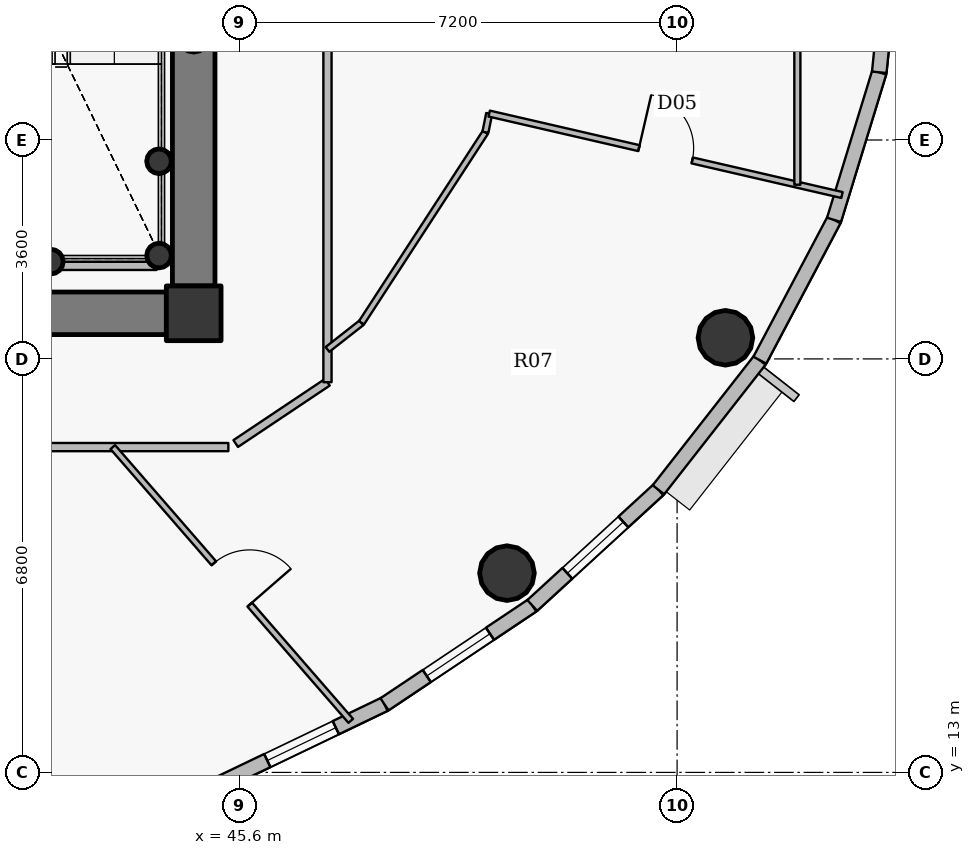
"""IFC4 building model, lengths in metres.
Left out: names, types, materials, properties, quantities, classifications, styles, units other than length and angle.
Written with IfcOpenShell. Run it as: python <this file> out.ifc"""

import sys

from ifc_helpers import new_model, si_unit, direction, frame, frame_2d, origin, origin_2d, place, context, subcontext, project, spatial, rectangle, hollow_circle, extrude, source, transform, mapped, element, fill, save


model = new_model("IFC4")
c1 = context("Model", 3, precision=1e-05, world=origin(), true_north=direction((0.0, 1.0)))
c2 = subcontext(c1, "Body", "Model", "MODEL_VIEW")
j1 = project(units=[si_unit("LENGTHUNIT", "METRE"), si_unit("PLANEANGLEUNIT", "RADIAN")], contexts=[c1])
p1 = place(None, origin())
s1 = spatial("IfcSite", under=j1, at=p1, CompositionType="ELEMENT")
p2 = place(p1, origin())
s2 = spatial("IfcBuilding", under=s1, at=p2, CompositionType="ELEMENT")
p3 = place(p2, frame((0.0, 0.0, 343.0)))
s3 = spatial("IfcBuildingStorey", under=s2, at=p3, CompositionType="ELEMENT", Elevation=343.0)
p4 = place(p3, frame((44.85, 20.55, 0.0), z_axis=(0.0, 0.0, 1.0), x_axis=(1.0, 0.0, 0.0)))
e1 = element("IfcColumn", 1, at=p4, inside=s3, PredefinedType="COLUMN", context=c2, shape_type="SweptSolid", body=[
    extrude(rectangle(XDim=0.9, YDim=0.9, at=origin_2d()), origin(), (0.0, 0.0, 1.0), 3.8),
])
for number, where, z_axis, x_axis in (
    (2, (44.28, 21.5, 0.0), (0.0, 0.0, 1.0), (1.0, 0.0, 0.0)),
    (3, (44.28, 23.05, 0.0), (0.0, 0.0, 1.0), (1.0, 0.0, 0.0)),
    (4, (42.5, 21.4, 0.0), (0.0, 0.0, 1.0), (1.0, 0.0, 0.0)),
):
    element("IfcColumn", number, at=place(p3, frame(where, z_axis=z_axis, x_axis=x_axis)), inside=s3, PredefinedType="COLUMN", context=c2, shape_type="SweptSolid", body=[
        extrude(hollow_circle(Radius=0.203, WallThickness=0.016, at=origin_2d()), origin(), (0.0, 0.0, 1.0), 3.8),
    ])
p5 = place(p3, frame((44.85, 33.0, 0.0), z_axis=(0.0, 0.0, 1.0), x_axis=(0.0, -1.0, 0.0)))
e5 = element("IfcWall", 5, at=p5, inside=s3, PredefinedType="SHEAR", context=c2, shape_type="SweptSolid", body=[
    extrude(rectangle(XDim=12.0, YDim=0.7, at=frame_2d((6.0, 0.0))), origin(), (0.0, 0.0, 1.0), 3.05),
])
p6 = place(p3, frame((44.4, 20.55, 0.0), z_axis=(0.0, 0.0, 1.0), x_axis=(-1.0, 0.0, 0.0)))
e6 = element("IfcWall", 6, at=p6, inside=s3, PredefinedType="SHEAR", context=c2, shape_type="SweptSolid", body=[
    extrude(rectangle(XDim=16.8, YDim=0.7, at=frame_2d((8.4, 0.0))), origin(), (0.0, 0.0, 1.0), 3.05),
])
p7 = place(p6, frame((13.0, 0.0, 0.0)))
e7 = element("IfcOpeningElement", 7, at=p7, cuts=e6, PredefinedType="OPENING", context=c2, shape_type="SweptSolid", body=[
    extrude(rectangle(XDim=1.15, YDim=2.15, at=origin_2d()), frame((0.575, 0.36, 1.075), z_axis=(0.0, -1.0, 0.0), x_axis=(1.0, 0.0, 0.0)), (0.0, 0.0, 1.0), 0.72),
])
p8 = place(p6, frame((9.15, 0.0, 0.0)))
e8 = element("IfcOpeningElement", 8, at=p8, cuts=e6, PredefinedType="OPENING", context=c2, shape_type="SweptSolid", body=[
    extrude(rectangle(XDim=1.15, YDim=2.15, at=origin_2d()), frame((0.575, 0.36, 1.075), z_axis=(0.0, -1.0, 0.0), x_axis=(1.0, 0.0, 0.0)), (0.0, 0.0, 1.0), 0.72),
])
for number, where, z_axis, x_axis in (
    (9, (42.137, 12.506, 0.0), (0.0, 0.0, 1.0), (1.0, 0.0, 0.0)),
    (10, (50.002, 16.277, 0.0), (0.0, 0.0, 1.0), (1.0, 0.0, 0.0)),
    (11, (53.595, 20.147, 0.0), (0.0, 0.0, 1.0), (1.0, 0.0, 0.0)),
):
    element("IfcColumn", number, at=place(p3, frame(where, z_axis=z_axis, x_axis=x_axis)), inside=s3, PredefinedType="COLUMN", context=c2, shape_type="SweptSolid", body=[
        extrude(hollow_circle(Radius=0.45, WallThickness=0.028, at=origin_2d()), origin(), (0.0, 0.0, 1.0), 3.8),
    ])
p9 = place(p3, frame((47.988, 14.12, 0.0), z_axis=(0.0, 0.0, 1.0), x_axis=(-0.901557057889, -0.432660226241, 0.0)))
e12 = element("IfcWall", 12, at=p9, inside=s3, PredefinedType="SOLIDWALL", context=c2, shape_type="SweptSolid", body=[
    extrude(rectangle(XDim=3.025, YDim=0.24, at=frame_2d((1.513, 0.0))), origin(), (0.0, 0.0, 1.0), 3.5),
])
p10 = place(p9, frame((0.888, 0.0, 0.9)))
e13 = element("IfcOpeningElement", 13, at=p10, cuts=e12, PredefinedType="OPENING", context=c2, shape_type="SweptSolid", body=[
    extrude(rectangle(XDim=1.25, YDim=1.65, at=origin_2d()), frame((0.625, 0.13, 0.825), z_axis=(0.0, -1.0, 0.0), x_axis=(1.0, 0.0, 0.0)), (0.0, 0.0, 1.0), 0.26),
])
p11 = place(p3, frame((50.419, 15.746, 0.0), z_axis=(0.0, 0.0, 1.0), x_axis=(-0.831201688654, -0.555970999944, 0.0)))
e14 = element("IfcWall", 14, at=p11, inside=s3, PredefinedType="SOLIDWALL", context=c2, shape_type="SweptSolid", body=[
    extrude(rectangle(XDim=2.925, YDim=0.24, at=frame_2d((1.462, 0.0))), origin(), (0.0, 0.0, 1.0), 3.5),
])
p12 = place(p11, frame((0.837, 0.0, 0.9)))
e15 = element("IfcOpeningElement", 15, at=p12, cuts=e14, PredefinedType="OPENING", context=c2, shape_type="SweptSolid", body=[
    extrude(rectangle(XDim=1.25, YDim=1.65, at=origin_2d()), frame((0.625, 0.13, 0.825), z_axis=(0.0, -1.0, 0.0), x_axis=(1.0, 0.0, 0.0)), (0.0, 0.0, 1.0), 0.26),
])
p13 = place(p3, frame((52.493, 17.648, 0.0), z_axis=(0.0, 0.0, 1.0), x_axis=(-0.737020907932, -0.675869944051, 0.0)))
e16 = element("IfcWall", 16, at=p13, inside=s3, PredefinedType="SOLIDWALL", context=c2, shape_type="SweptSolid", body=[
    extrude(rectangle(XDim=2.815, YDim=0.24, at=frame_2d((1.407, 0.0))), origin(), (0.0, 0.0, 1.0), 3.5),
])
p14 = place(p13, frame((0.783, 0.0, 0.9)))
e17 = element("IfcOpeningElement", 17, at=p14, cuts=e16, PredefinedType="OPENING", context=c2, shape_type="SweptSolid", body=[
    extrude(rectangle(XDim=1.25, YDim=1.65, at=origin_2d()), frame((0.625, 0.13, 0.825), z_axis=(0.0, -1.0, 0.0), x_axis=(1.0, 0.0, 0.0)), (0.0, 0.0, 1.0), 0.26),
])
p15 = place(p3, frame((54.161, 19.779, 0.0), z_axis=(0.0, 0.0, 1.0), x_axis=(-0.616286367698, -0.78752213492, 0.0)))
e18 = element("IfcWall", 18, at=p15, inside=s3, PredefinedType="SOLIDWALL", context=c2, shape_type="SweptSolid", body=[
    extrude(rectangle(XDim=2.706, YDim=0.24, at=frame_2d((1.353, 0.0))), origin(), (0.0, 0.0, 1.0), 1.685),
])
p16 = place(p3, frame((55.381, 22.087, 0.0), z_axis=(0.0, 0.0, 1.0), x_axis=(-0.467487999989, -0.883999417345, 0.0)))
e19 = element("IfcWall", 19, at=p16, inside=s3, PredefinedType="SOLIDWALL", context=c2, shape_type="SweptSolid", body=[
    extrude(rectangle(XDim=2.61, YDim=0.24, at=frame_2d((1.305, 0.0))), origin(), (0.0, 0.0, 1.0), 1.685),
])
p17 = place(p3, frame((56.125, 24.513, 0.0), z_axis=(0.0, 0.0, 1.0), x_axis=(-0.293105547213, -0.956080089842, 0.0)))
e20 = element("IfcWall", 20, at=p17, inside=s3, PredefinedType="SOLIDWALL", context=c2, shape_type="SweptSolid", body=[
    extrude(rectangle(XDim=2.538, YDim=0.24, at=frame_2d((1.269, 0.0))), origin(), (0.0, 0.0, 1.0), 3.5),
])
p18 = place(p3, frame((56.375, 27.0, 0.0), z_axis=(0.0, 0.0, 1.0), x_axis=(-0.100025963401, -0.994984827344, 0.0)))
e21 = element("IfcWall", 21, at=p18, inside=s3, PredefinedType="SOLIDWALL", context=c2, shape_type="SweptSolid", body=[
    extrude(rectangle(XDim=2.499, YDim=0.24, at=frame_2d((1.25, 0.0))), origin(), (0.0, 0.0, 1.0), 3.5),
])
p19 = place(p3, frame((26.58, 18.35, 0.0), z_axis=(0.0, 0.0, 1.0), x_axis=(1.0, 0.0, 0.0)))
e22 = element("IfcWall", 22, at=p19, inside=s3, PredefinedType="PARTITIONING", context=c2, shape_type="SweptSolid", body=[
    extrude(rectangle(XDim=18.84, YDim=0.135, at=frame_2d((9.42, 0.0))), origin(), (0.0, 0.0, 1.0), 2.285),
])
p20 = place(p3, frame((43.519, 18.35, 0.0), z_axis=(0.0, 0.0, 1.0), x_axis=(0.656046983359, -0.754720051162, 0.0)))
e23 = element("IfcWall", 23, at=p20, inside=s3, PredefinedType="PARTITIONING", context=c2, shape_type="SweptSolid", body=[
    extrude(rectangle(XDim=5.965, YDim=0.1, at=frame_2d((2.983, 0.0))), origin(), (0.0, 0.0, 1.0), 2.985),
])
p21 = place(p20, frame((2.533, 0.0, 0.0)))
e24 = element("IfcOpeningElement", 24, at=p21, cuts=e23, PredefinedType="OPENING", context=c2, shape_type="SweptSolid", body=[
    extrude(rectangle(XDim=0.9, YDim=2.1, at=origin_2d()), frame((0.45, 0.06, 1.05), z_axis=(0.0, -1.0, 0.0), x_axis=(1.0, 0.0, 0.0)), (0.0, 0.0, 1.0), 0.12),
])
p22 = place(p3, frame((45.541, 18.408, 0.0), z_axis=(0.0, 0.0, 1.0), x_axis=(0.831180227396, 0.556003084151, 0.0)))
e25 = element("IfcWall", 25, at=p22, inside=s3, PredefinedType="PARTITIONING", context=c2, shape_type="SweptSolid", body=[
    extrude(rectangle(XDim=1.815, YDim=0.135, at=frame_2d((0.908, 0.0))), origin(), (0.0, 0.0, 1.0), 2.285),
])
p23 = place(p3, frame((47.05, 19.417, 0.0), z_axis=(0.0, 0.0, 1.0), x_axis=(0.0, 1.0, 0.0)))
e26 = element("IfcWall", 26, at=p23, inside=s3, PredefinedType="PARTITIONING", context=c2, shape_type="SweptSolid", body=[
    extrude(rectangle(XDim=13.37, YDim=0.135, at=frame_2d((6.685, 0.0))), origin(), (0.0, 0.0, 1.0), 2.25),
])
p24 = place(p23, frame((6.434, 0.0, 0.0)))
e27 = element("IfcOpeningElement", 27, at=p24, cuts=e26, PredefinedType="OPENING", context=c2, shape_type="SweptSolid", body=[
    extrude(rectangle(XDim=1.0, YDim=2.15, at=origin_2d()), frame((0.5, 0.078, 1.075), z_axis=(0.0, -1.0, 0.0), x_axis=(1.0, 0.0, 0.0)), (0.0, 0.0, 1.0), 0.155),
])
p25 = place(p3, frame((47.05, 19.956, 0.0), z_axis=(0.0, 0.0, 1.0), x_axis=(0.787164110493, 0.616743595956, 0.0)))
e28 = element("IfcWall", 28, at=p25, inside=s3, PredefinedType="PARTITIONING", context=c2, shape_type="SweptSolid", body=[
    extrude(rectangle(XDim=0.71, YDim=0.1, at=frame_2d((0.355, 0.0))), origin(), (0.0, 0.0, 1.0), 2.25),
])
p26 = place(p3, frame((47.609, 20.394, 0.0), z_axis=(0.0, 0.0, 1.0), x_axis=(0.545364838352, 0.838198778983, 0.0)))
e29 = element("IfcWall", 29, at=p26, inside=s3, PredefinedType="PARTITIONING", context=c2, shape_type="SweptSolid", body=[
    extrude(rectangle(XDim=3.738, YDim=0.1, at=frame_2d((1.869, 0.0))), origin(), (0.0, 0.0, 1.0), 2.25),
])
p27 = place(p3, frame((49.648, 23.527, 0.0), z_axis=(0.0, 0.0, 1.0), x_axis=(0.198359507495, 0.980129331153, 0.0)))
e30 = element("IfcWall", 30, at=p27, inside=s3, PredefinedType="PARTITIONING", context=c2, shape_type="SweptSolid", body=[
    extrude(rectangle(XDim=0.314, YDim=0.1, at=frame_2d((0.157, 0.0))), origin(), (0.0, 0.0, 1.0), 3.5),
])
p28 = place(p3, frame((49.71, 23.835, 0.0), z_axis=(0.0, 0.0, 1.0), x_axis=(0.974373225384, -0.224937363847, 0.0)))
e31 = element("IfcWall", 31, at=p28, inside=s3, PredefinedType="PARTITIONING", context=c2, shape_type="SweptSolid", body=[
    extrude(rectangle(XDim=5.954, YDim=0.1, at=frame_2d((2.977, 0.0))), origin(), (0.0, 0.0, 1.0), 2.985),
])
p29 = place(p28, frame((2.527, 0.0, 0.0)))
e32 = element("IfcOpeningElement", 32, at=p29, cuts=e31, PredefinedType="OPENING", context=c2, shape_type="SweptSolid", body=[
    extrude(rectangle(XDim=0.9, YDim=2.1, at=origin_2d()), frame((0.45, 0.06, 1.05), z_axis=(0.0, -1.0, 0.0), x_axis=(1.0, 0.0, 0.0)), (0.0, 0.0, 1.0), 0.12),
])
p30 = place(p3, frame((54.778, 22.665, 0.0), z_axis=(0.0, 0.0, 1.0), x_axis=(0.0, 1.0, 0.0)))
e33 = element("IfcWall", 33, at=p30, inside=s3, PredefinedType="PARTITIONING", context=c2, shape_type="SweptSolid", body=[
    extrude(rectangle(XDim=10.4, YDim=0.1, at=frame_2d((5.2, 0.0))), origin(), (0.0, 0.0, 1.0), 2.25),
])
p31 = place(p30, frame((6.139, 0.0, 0.0)))
e34 = element("IfcOpeningElement", 34, at=p31, cuts=e33, PredefinedType="OPENING", context=c2, shape_type="SweptSolid", body=[
    extrude(rectangle(XDim=0.9, YDim=2.1, at=origin_2d()), frame((0.45, 0.06, 1.05), z_axis=(0.0, -1.0, 0.0), x_axis=(1.0, 0.0, 0.0)), (0.0, 0.0, 1.0), 0.12),
])
p32 = place(p3, frame((44.24, 21.33, 0.0), z_axis=(0.0, 0.0, 1.0), x_axis=(-1.0, 0.0, 0.0)))
e35 = element("IfcWall", 35, at=p32, inside=s3, PredefinedType="PARTITIONING", context=c2, shape_type="SweptSolid", body=[
    extrude(rectangle(XDim=2.98, YDim=0.135, at=frame_2d((1.49, 0.0))), origin(), (0.0, 0.0, 1.0), 3.035),
])
p33 = place(p3, frame((44.41, 20.2, 0.0), z_axis=(0.0, 0.0, 1.0), x_axis=(1.0, 0.0, 0.0)))
e36 = element("IfcWall", 36, at=p33, inside=s3, PredefinedType="PARTITIONING", context=c2, shape_type="SweptSolid", body=[
    extrude(rectangle(XDim=0.79, YDim=0.135, at=frame_2d((0.395, 0.0))), origin(), (0.0, 0.0, 1.0), 2.25),
])
p34 = place(p3, frame((45.2, 20.508, 0.0), z_axis=(0.0, 0.0, 1.0), x_axis=(0.0, 1.0, 0.0)))
e37 = element("IfcWall", 37, at=p34, inside=s3, PredefinedType="PARTITIONING", context=c2, shape_type="SweptSolid", body=[
    extrude(rectangle(XDim=0.482, YDim=0.135, at=frame_2d((0.241, 0.0))), origin(), (0.0, 0.0, 1.0), 3.5),
])
m1 = source(origin(), c2, "Body", "SweptSolid", [
    extrude(rectangle(XDim=1.25, YDim=1.65, at=origin_2d()), frame((0.625, 0.03, 0.825), z_axis=(0.0, -1.0, 0.0), x_axis=(1.0, 0.0, 0.0)), (0.0, 0.0, 1.0), 0.06),
])
p35 = place(p10, origin())
e38 = element("IfcWindow", 38, at=p35, inside=s3, PartitioningType="SINGLE_PANEL", PredefinedType="WINDOW", context=c2, shape_type="MappedRepresentation", body=[
    mapped(m1, transform((0.0, 0.0, 0.0), x_axis=(1.0, 0.0, 0.0), y_axis=(0.0, 1.0, 0.0), z_axis=(0.0, 0.0, 1.0), scale=1.0)),
])
fill(e13, e38)
p36 = place(p12, origin())
e39 = element("IfcWindow", 39, at=p36, inside=s3, PartitioningType="SINGLE_PANEL", PredefinedType="WINDOW", context=c2, shape_type="MappedRepresentation", body=[
    mapped(m1, transform((0.0, 0.0, 0.0), x_axis=(1.0, 0.0, 0.0), y_axis=(0.0, 1.0, 0.0), z_axis=(0.0, 0.0, 1.0), scale=1.0)),
])
fill(e15, e39)
p37 = place(p14, origin())
e40 = element("IfcWindow", 40, at=p37, inside=s3, PartitioningType="SINGLE_PANEL", PredefinedType="WINDOW", context=c2, shape_type="MappedRepresentation", body=[
    mapped(m1, transform((0.0, 0.0, 0.0), x_axis=(1.0, 0.0, 0.0), y_axis=(0.0, 1.0, 0.0), z_axis=(0.0, 0.0, 1.0), scale=1.0)),
])
fill(e17, e40)
m2 = source(origin(), c2, "Body", "SweptSolid", [
    extrude(rectangle(XDim=0.9, YDim=2.1, at=origin_2d()), frame((0.45, 0.025, 1.05), z_axis=(0.0, -1.0, 0.0), x_axis=(1.0, 0.0, 0.0)), (0.0, 0.0, 1.0), 0.05),
])
p38 = place(p29, origin())
e41 = element("IfcDoor", 41, at=p38, inside=s3, OperationType="SINGLE_SWING_LEFT", PredefinedType="DOOR", context=c2, shape_type="MappedRepresentation", body=[
    mapped(m2, transform((0.0, 0.0, 0.0), x_axis=(1.0, 0.0, 0.0), y_axis=(0.0, 1.0, 0.0), z_axis=(0.0, 0.0, 1.0), scale=1.0)),
])
fill(e32, e41)
p39 = place(p21, origin())
e42 = element("IfcDoor", 42, at=p39, inside=s3, OperationType="SINGLE_SWING_RIGHT", PredefinedType="DOOR", context=c2, shape_type="MappedRepresentation", body=[
    mapped(m2, transform((0.0, 0.0, 0.0), x_axis=(1.0, 0.0, 0.0), y_axis=(0.0, 1.0, 0.0), z_axis=(0.0, 0.0, 1.0), scale=1.0)),
])
fill(e24, e42)
save(model, sys.argv[1])
